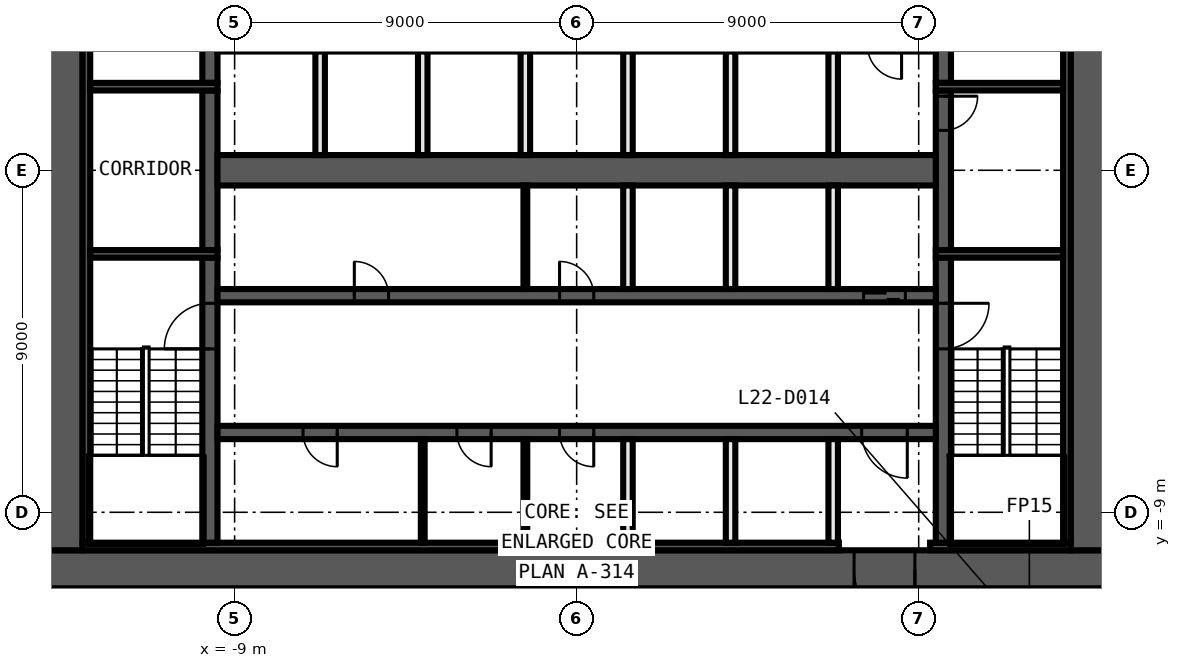
"""IFC4 building model, lengths in metres.
Left out: names, types, materials, properties, quantities, classifications, styles, units other than length and angle.
Written with IfcOpenShell. Run it as: python <this file> out.ifc"""

import sys

from ifc_helpers import new_model, si_unit, direction, frame, frame_2d, origin, place, context, subcontext, project, spatial, rectangle, extrude, element, fill, save


model = new_model("IFC4")
c1 = context("Model", 3, precision=1e-05, world=origin(), true_north=direction((0.0, 1.0)))
c2 = subcontext(c1, "Body", "Model", "MODEL_VIEW")
j1 = project(units=[si_unit("LENGTHUNIT", "METRE"), si_unit("PLANEANGLEUNIT", "RADIAN")], contexts=[c1])
p1 = place(None, origin())
s1 = spatial("IfcSite", under=j1, at=p1, CompositionType="ELEMENT")
p2 = place(p1, origin())
s2 = spatial("IfcBuilding", under=s1, at=p2, CompositionType="ELEMENT")
p3 = place(p2, frame((0.0, 0.0, 106.3)))
s3 = spatial("IfcBuildingStorey", under=s2, at=p3, CompositionType="ELEMENT", Elevation=106.3)
p4 = place(p3, frame((14.0, -10.5, 0.0), z_axis=(0.0, 0.0, 1.0), x_axis=(-1.0, 0.0, 0.0)))
e1 = element("IfcWall", 1, at=p4, inside=s3, PredefinedType="SHEAR", context=c2, shape_type="SweptSolid", body=[
    extrude(rectangle(XDim=28.0, YDim=1.0, at=frame_2d((14.0, 0.0))), origin(), (0.0, 0.0, 1.0), 3.3),
])
p5 = place(p4, frame((5.1, 0.0, 0.0)))
e2 = element("IfcOpeningElement", 2, at=p5, cuts=e1, PredefinedType="OPENING", context=c2, shape_type="SweptSolid", body=[
    extrude(rectangle(XDim=1.6, YDim=2.1, at=frame_2d((0.8, 1.05))), frame((0.0, 0.51, 0.0), z_axis=(0.0, -1.0, 0.0), x_axis=(1.0, 0.0, 0.0)), (0.0, 0.0, 1.0), 1.02),
])
for number, where, z_axis, x_axis in (
    (3, (13.5, 10.0, 0.0), (0.0, 0.0, 1.0), (0.0, -1.0, 0.0)),
    (4, (-13.5, -10.0, 0.0), (0.0, 0.0, 1.0), (0.0, 1.0, 0.0)),
):
    element("IfcWall", number, at=place(p3, frame(where, z_axis=z_axis, x_axis=x_axis)), inside=s3, PredefinedType="SHEAR", context=c2, shape_type="SweptSolid", body=[
        extrude(rectangle(XDim=20.0, YDim=1.0, at=frame_2d((10.0, 0.0))), origin(), (0.0, 0.0, 1.0), 3.3),
    ])
p6 = place(p3, frame((13.0, -9.9, 0.0), z_axis=(0.0, 0.0, 1.0), x_axis=(-1.0, 0.0, 0.0)))
e5 = element("IfcWall", 5, at=p6, inside=s3, PredefinedType="SHEAR", context=c2, shape_type="SweptSolid", body=[
    extrude(rectangle(XDim=3.7, YDim=0.2, at=frame_2d((1.85, 0.0))), origin(), (0.0, 0.0, 1.0), 3.3),
])
p7 = place(p3, frame((6.9, -9.9, 0.0), z_axis=(0.0, 0.0, 1.0), x_axis=(-1.0, 0.0, 0.0)))
e6 = element("IfcWall", 6, at=p7, inside=s3, PredefinedType="SHEAR", context=c2, shape_type="SweptSolid", body=[
    extrude(rectangle(XDim=19.9, YDim=0.2, at=frame_2d((9.95, 0.0))), origin(), (0.0, 0.0, 1.0), 3.3),
])
for number, where, z_axis, x_axis in (
    (7, (12.9, 9.8, 0.0), (0.0, 0.0, 1.0), (0.0, -1.0, 0.0)),
    (8, (-12.9, -9.8, 0.0), (0.0, 0.0, 1.0), (0.0, 1.0, 0.0)),
):
    element("IfcWall", number, at=place(p3, frame(where, z_axis=z_axis, x_axis=x_axis)), inside=s3, PredefinedType="SHEAR", context=c2, shape_type="SweptSolid", body=[
        extrude(rectangle(XDim=19.6, YDim=0.2, at=frame_2d((9.8, 0.0))), origin(), (0.0, 0.0, 1.0), 3.3),
    ])
p8 = place(p3, frame((9.65, -2.3, 0.0), z_axis=(0.0, 0.0, 1.0), x_axis=(0.0, -1.0, 0.0)))
e9 = element("IfcWall", 9, at=p8, inside=s3, PredefinedType="SHEAR", context=c2, shape_type="SweptSolid", body=[
    extrude(rectangle(XDim=7.5, YDim=0.4, at=frame_2d((3.75, 0.0))), origin(), (0.0, 0.0, 1.0), 3.3),
])
p9 = place(p8, frame((1.2, 0.0, 0.0)))
e10 = element("IfcOpeningElement", 10, at=p9, cuts=e9, PredefinedType="OPENING", context=c2, shape_type="SweptSolid", body=[
    extrude(rectangle(XDim=1.2, YDim=2.1, at=frame_2d((0.6, 1.05))), frame((0.0, 0.21, 0.0), z_axis=(0.0, -1.0, 0.0), x_axis=(1.0, 0.0, 0.0)), (0.0, 0.0, 1.0), 0.42),
])
p10 = place(p3, frame((9.65, 2.1, 0.0), z_axis=(0.0, 0.0, 1.0), x_axis=(0.0, -1.0, 0.0)))
e11 = element("IfcWall", 11, at=p10, inside=s3, PredefinedType="SHEAR", context=c2, shape_type="SweptSolid", body=[
    extrude(rectangle(XDim=4.2, YDim=0.4, at=frame_2d((2.1, 0.0))), origin(), (0.0, 0.0, 1.0), 3.3),
])
p11 = place(p10, frame((0.15, 0.0, 0.0)))
e12 = element("IfcOpeningElement", 12, at=p11, cuts=e11, PredefinedType="OPENING", context=c2, shape_type="SweptSolid", body=[
    extrude(rectangle(XDim=0.9, YDim=2.1, at=frame_2d((0.45, 1.05))), frame((0.0, 0.21, 0.0), z_axis=(0.0, -1.0, 0.0), x_axis=(1.0, 0.0, 0.0)), (0.0, 0.0, 1.0), 0.42),
])
p12 = place(p3, frame((9.65, 9.8, 0.0), z_axis=(0.0, 0.0, 1.0), x_axis=(0.0, -1.0, 0.0)))
e13 = element("IfcWall", 13, at=p12, inside=s3, PredefinedType="SHEAR", context=c2, shape_type="SweptSolid", body=[
    extrude(rectangle(XDim=7.5, YDim=0.4, at=frame_2d((3.75, 0.0))), origin(), (0.0, 0.0, 1.0), 3.3),
])
p13 = place(p12, frame((5.1, 0.0, 0.0)))
e14 = element("IfcOpeningElement", 14, at=p13, cuts=e13, PredefinedType="OPENING", context=c2, shape_type="SweptSolid", body=[
    extrude(rectangle(XDim=1.2, YDim=2.1, at=frame_2d((0.6, 1.05))), frame((0.0, 0.21, 0.0), z_axis=(0.0, -1.0, 0.0), x_axis=(1.0, 0.0, 0.0)), (0.0, 0.0, 1.0), 0.42),
])
p14 = place(p3, frame((-9.65, -9.8, 0.0), z_axis=(0.0, 0.0, 1.0), x_axis=(0.0, 1.0, 0.0)))
e15 = element("IfcWall", 15, at=p14, inside=s3, PredefinedType="SHEAR", context=c2, shape_type="SweptSolid", body=[
    extrude(rectangle(XDim=7.5, YDim=0.4, at=frame_2d((3.75, 0.0))), origin(), (0.0, 0.0, 1.0), 3.3),
])
p15 = place(p14, frame((5.1, 0.0, 0.0)))
e16 = element("IfcOpeningElement", 16, at=p15, cuts=e15, PredefinedType="OPENING", context=c2, shape_type="SweptSolid", body=[
    extrude(rectangle(XDim=1.2, YDim=2.1, at=frame_2d((0.6, 1.05))), frame((0.0, 0.21, 0.0), z_axis=(0.0, -1.0, 0.0), x_axis=(1.0, 0.0, 0.0)), (0.0, 0.0, 1.0), 0.42),
])
p16 = place(p3, frame((-9.65, -2.1, 0.0), z_axis=(0.0, 0.0, 1.0), x_axis=(0.0, 1.0, 0.0)))
e17 = element("IfcWall", 17, at=p16, inside=s3, PredefinedType="SHEAR", context=c2, shape_type="SweptSolid", body=[
    extrude(rectangle(XDim=4.2, YDim=0.4, at=frame_2d((2.1, 0.0))), origin(), (0.0, 0.0, 1.0), 3.3),
])
p17 = place(p3, frame((-9.65, 2.3, 0.0), z_axis=(0.0, 0.0, 1.0), x_axis=(0.0, 1.0, 0.0)))
e18 = element("IfcWall", 18, at=p17, inside=s3, PredefinedType="SHEAR", context=c2, shape_type="SweptSolid", body=[
    extrude(rectangle(XDim=7.5, YDim=0.4, at=frame_2d((3.75, 0.0))), origin(), (0.0, 0.0, 1.0), 3.3),
])
p18 = place(p17, frame((1.2, 0.0, 0.0)))
e19 = element("IfcOpeningElement", 19, at=p18, cuts=e18, PredefinedType="OPENING", context=c2, shape_type="SweptSolid", body=[
    extrude(rectangle(XDim=1.2, YDim=2.1, at=frame_2d((0.6, 1.05))), frame((0.0, 0.21, 0.0), z_axis=(0.0, -1.0, 0.0), x_axis=(1.0, 0.0, 0.0)), (0.0, 0.0, 1.0), 0.42),
])
for number, where, z_axis, x_axis in (
    (20, (9.45, 2.2, 0.0), (0.0, 0.0, 1.0), (1.0, 0.0, 0.0)),
    (21, (-9.45, 2.2, 0.0), (0.0, 0.0, 1.0), (-1.0, 0.0, 0.0)),
    (22, (9.45, -2.2, 0.0), (0.0, 0.0, 1.0), (1.0, 0.0, 0.0)),
    (23, (-9.45, -2.2, 0.0), (0.0, 0.0, 1.0), (-1.0, 0.0, 0.0)),
):
    element("IfcWall", number, at=place(p3, frame(where, z_axis=z_axis, x_axis=x_axis)), inside=s3, PredefinedType="SHEAR", context=c2, shape_type="SweptSolid", body=[
        extrude(rectangle(XDim=3.35, YDim=0.2, at=frame_2d((1.675, 0.0))), origin(), (0.0, 0.0, 1.0), 3.3),
    ])
p19 = place(p3, frame((-9.45, -3.3, 0.0), z_axis=(0.0, 0.0, 1.0), x_axis=(1.0, 0.0, 0.0)))
e24 = element("IfcWall", 24, at=p19, inside=s3, PredefinedType="SHEAR", context=c2, shape_type="SweptSolid", body=[
    extrude(rectangle(XDim=18.9, YDim=0.35, at=frame_2d((9.45, 0.0))), origin(), (0.0, 0.0, 1.0), 3.3),
])
p20 = place(p19, frame((17.0, 0.0, 0.0)))
e25 = element("IfcOpeningElement", 25, at=p20, cuts=e24, PredefinedType="OPENING", context=c2, shape_type="SweptSolid", body=[
    extrude(rectangle(XDim=1.1, YDim=2.1, at=frame_2d((0.55, 1.05))), frame((0.0, 0.185, 0.0), z_axis=(0.0, -1.0, 0.0), x_axis=(1.0, 0.0, 0.0)), (0.0, 0.0, 1.0), 0.37),
])
p21 = place(p19, frame((3.6, 0.0, 0.0)))
e26 = element("IfcOpeningElement", 26, at=p21, cuts=e24, PredefinedType="OPENING", context=c2, shape_type="SweptSolid", body=[
    extrude(rectangle(XDim=0.9, YDim=2.1, at=frame_2d((0.45, 1.05))), frame((0.0, 0.185, 0.0), z_axis=(0.0, -1.0, 0.0), x_axis=(1.0, 0.0, 0.0)), (0.0, 0.0, 1.0), 0.37),
])
p22 = place(p19, frame((9.0, 0.0, 0.0)))
e27 = element("IfcOpeningElement", 27, at=p22, cuts=e24, PredefinedType="OPENING", context=c2, shape_type="SweptSolid", body=[
    extrude(rectangle(XDim=0.9, YDim=2.1, at=frame_2d((0.45, 1.05))), frame((0.0, 0.185, 0.0), z_axis=(0.0, -1.0, 0.0), x_axis=(1.0, 0.0, 0.0)), (0.0, 0.0, 1.0), 0.37),
])
p23 = place(p3, frame((9.45, -6.9, 0.0), z_axis=(0.0, 0.0, 1.0), x_axis=(-1.0, 0.0, 0.0)))
e28 = element("IfcWall", 28, at=p23, inside=s3, PredefinedType="SHEAR", context=c2, shape_type="SweptSolid", body=[
    extrude(rectangle(XDim=18.9, YDim=0.35, at=frame_2d((9.45, 0.0))), origin(), (0.0, 0.0, 1.0), 3.3),
])
p24 = place(p23, frame((0.75, 0.0, 0.0)))
e29 = element("IfcOpeningElement", 29, at=p24, cuts=e28, PredefinedType="OPENING", context=c2, shape_type="SweptSolid", body=[
    extrude(rectangle(XDim=1.2, YDim=2.1, at=frame_2d((0.6, 1.05))), frame((0.0, 0.185, 0.0), z_axis=(0.0, -1.0, 0.0), x_axis=(1.0, 0.0, 0.0)), (0.0, 0.0, 1.0), 0.37),
])
p25 = place(p23, frame((15.75, 0.0, 0.0)))
e30 = element("IfcOpeningElement", 30, at=p25, cuts=e28, PredefinedType="OPENING", context=c2, shape_type="SweptSolid", body=[
    extrude(rectangle(XDim=0.9, YDim=2.1, at=frame_2d((0.45, 1.05))), frame((0.0, 0.185, 0.0), z_axis=(0.0, -1.0, 0.0), x_axis=(1.0, 0.0, 0.0)), (0.0, 0.0, 1.0), 0.37),
])
p26 = place(p23, frame((11.7, 0.0, 0.0)))
e31 = element("IfcOpeningElement", 31, at=p26, cuts=e28, PredefinedType="OPENING", context=c2, shape_type="SweptSolid", body=[
    extrude(rectangle(XDim=0.9, YDim=2.1, at=frame_2d((0.45, 1.05))), frame((0.0, 0.185, 0.0), z_axis=(0.0, -1.0, 0.0), x_axis=(1.0, 0.0, 0.0)), (0.0, 0.0, 1.0), 0.37),
])
p27 = place(p23, frame((9.0, 0.0, 0.0)))
e32 = element("IfcOpeningElement", 32, at=p27, cuts=e28, PredefinedType="OPENING", context=c2, shape_type="SweptSolid", body=[
    extrude(rectangle(XDim=0.9, YDim=2.1, at=frame_2d((0.45, 1.05))), frame((0.0, 0.185, 0.0), z_axis=(0.0, -1.0, 0.0), x_axis=(1.0, 0.0, 0.0)), (0.0, 0.0, 1.0), 0.37),
])
p28 = place(p3, frame((-9.45, 0.0, 0.0), z_axis=(0.0, 0.0, 1.0), x_axis=(1.0, 0.0, 0.0)))
e33 = element("IfcWall", 33, at=p28, inside=s3, PredefinedType="SHEAR", context=c2, shape_type="SweptSolid", body=[
    extrude(rectangle(XDim=18.9, YDim=0.8, at=frame_2d((9.45, 0.0))), origin(), (0.0, 0.0, 1.0), 3.3),
])
for number, where, z_axis, x_axis in (
    (34, (6.75, -9.8, 0.0), (0.0, 0.0, 1.0), (0.0, 1.0, 0.0)),
    (35, (6.75, -3.125, 0.0), (0.0, 0.0, 1.0), (0.0, 1.0, 0.0)),
    (36, (6.75, 0.4, 0.0), (0.0, 0.0, 1.0), (0.0, 1.0, 0.0)),
    (37, (4.05, -9.8, 0.0), (0.0, 0.0, 1.0), (0.0, 1.0, 0.0)),
    (38, (4.05, -3.125, 0.0), (0.0, 0.0, 1.0), (0.0, 1.0, 0.0)),
    (39, (4.05, 0.4, 0.0), (0.0, 0.0, 1.0), (0.0, 1.0, 0.0)),
    (40, (1.35, -9.8, 0.0), (0.0, 0.0, 1.0), (0.0, 1.0, 0.0)),
    (41, (1.35, -3.125, 0.0), (0.0, 0.0, 1.0), (0.0, 1.0, 0.0)),
    (42, (1.35, 0.4, 0.0), (0.0, 0.0, 1.0), (0.0, 1.0, 0.0)),
):
    element("IfcWall", number, at=place(p3, frame(where, z_axis=z_axis, x_axis=x_axis)), inside=s3, PredefinedType="SOLIDWALL", context=c2, shape_type="SweptSolid", body=[
        extrude(rectangle(XDim=2.725, YDim=0.25, at=frame_2d((1.363, 0.0))), origin(), (0.0, 0.0, 1.0), 3.3),
    ])
for number, where, z_axis, x_axis in (
    (43, (-1.35, -9.8, 0.0), (0.0, 0.0, 1.0), (0.0, 1.0, 0.0)),
    (44, (-1.35, -3.125, 0.0), (0.0, 0.0, 1.0), (0.0, 1.0, 0.0)),
):
    element("IfcWall", number, at=place(p3, frame(where, z_axis=z_axis, x_axis=x_axis)), inside=s3, PredefinedType="PARTITIONING", context=c2, shape_type="SweptSolid", body=[
        extrude(rectangle(XDim=2.725, YDim=0.1, at=frame_2d((1.363, 0.0))), origin(), (0.0, 0.0, 1.0), 3.3),
    ])
p29 = place(p3, frame((-1.35, 0.4, 0.0), z_axis=(0.0, 0.0, 1.0), x_axis=(0.0, 1.0, 0.0)))
e45 = element("IfcWall", 45, at=p29, inside=s3, PredefinedType="SOLIDWALL", context=c2, shape_type="SweptSolid", body=[
    extrude(rectangle(XDim=2.725, YDim=0.25, at=frame_2d((1.363, 0.0))), origin(), (0.0, 0.0, 1.0), 3.3),
])
p30 = place(p3, frame((-4.05, -9.8, 0.0), z_axis=(0.0, 0.0, 1.0), x_axis=(0.0, 1.0, 0.0)))
e46 = element("IfcWall", 46, at=p30, inside=s3, PredefinedType="PARTITIONING", context=c2, shape_type="SweptSolid", body=[
    extrude(rectangle(XDim=2.725, YDim=0.1, at=frame_2d((1.363, 0.0))), origin(), (0.0, 0.0, 1.0), 3.3),
])
for number, where, z_axis, x_axis in (
    (47, (-4.05, 0.4, 0.0), (0.0, 0.0, 1.0), (0.0, 1.0, 0.0)),
    (48, (-6.75, 0.4, 0.0), (0.0, 0.0, 1.0), (0.0, 1.0, 0.0)),
):
    element("IfcWall", number, at=place(p3, frame(where, z_axis=z_axis, x_axis=x_axis)), inside=s3, PredefinedType="SOLIDWALL", context=c2, shape_type="SweptSolid", body=[
        extrude(rectangle(XDim=2.725, YDim=0.25, at=frame_2d((1.363, 0.0))), origin(), (0.0, 0.0, 1.0), 3.3),
    ])
p31 = place(p11, origin())
e49 = element("IfcDoor", 49, at=p31, inside=s3, OperationType="SINGLE_SWING_RIGHT", PredefinedType="DOOR", context=c2, shape_type="SweptSolid", body=[
    extrude(rectangle(XDim=0.9, YDim=2.1, at=frame_2d((0.45, 1.05))), frame((0.0, 0.025, 0.0), z_axis=(0.0, -1.0, 0.0), x_axis=(1.0, 0.0, 0.0)), (0.0, 0.0, 1.0), 0.05),
])
fill(e12, e49)
p32 = place(p20, origin())
e50 = element("IfcDoor", 50, at=p32, inside=s3, OperationType="DOUBLE_DOOR_SLIDING", PredefinedType="DOOR", context=c2, shape_type="SweptSolid", body=[
    extrude(rectangle(XDim=1.1, YDim=2.1, at=frame_2d((0.55, 1.05))), frame((0.0, 0.025, 0.0), z_axis=(0.0, -1.0, 0.0), x_axis=(1.0, 0.0, 0.0)), (0.0, 0.0, 1.0), 0.05),
])
fill(e25, e50)
p33 = place(p5, origin())
e51 = element("IfcDoor", 51, at=p33, inside=s3, OperationType="DOUBLE_DOOR_SINGLE_SWING", PredefinedType="DOOR", context=c2, shape_type="SweptSolid", body=[
    extrude(rectangle(XDim=1.6, YDim=2.1, at=frame_2d((0.8, 1.05))), frame((0.0, 0.025, 0.0), z_axis=(0.0, -1.0, 0.0), x_axis=(1.0, 0.0, 0.0)), (0.0, 0.0, 1.0), 0.05),
])
fill(e2, e51)
p34 = place(p24, origin())
e52 = element("IfcDoor", 52, at=p34, inside=s3, OperationType="SINGLE_SWING_LEFT", PredefinedType="DOOR", context=c2, shape_type="SweptSolid", body=[
    extrude(rectangle(XDim=1.2, YDim=2.1, at=frame_2d((0.6, 1.05))), frame((0.0, 0.025, 0.0), z_axis=(0.0, -1.0, 0.0), x_axis=(1.0, 0.0, 0.0)), (0.0, 0.0, 1.0), 0.05),
])
fill(e29, e52)
p35 = place(p21, origin())
e53 = element("IfcDoor", 53, at=p35, inside=s3, OperationType="SINGLE_SWING_RIGHT", PredefinedType="DOOR", context=c2, shape_type="SweptSolid", body=[
    extrude(rectangle(XDim=0.9, YDim=2.1, at=frame_2d((0.45, 1.05))), frame((0.0, 0.025, 0.0), z_axis=(0.0, -1.0, 0.0), x_axis=(1.0, 0.0, 0.0)), (0.0, 0.0, 1.0), 0.05),
])
fill(e26, e53)
p36 = place(p22, origin())
e54 = element("IfcDoor", 54, at=p36, inside=s3, OperationType="SINGLE_SWING_LEFT", PredefinedType="DOOR", context=c2, shape_type="SweptSolid", body=[
    extrude(rectangle(XDim=0.9, YDim=2.1, at=frame_2d((0.45, 1.05))), frame((0.0, 0.025, 0.0), z_axis=(0.0, -1.0, 0.0), x_axis=(1.0, 0.0, 0.0)), (0.0, 0.0, 1.0), 0.05),
])
fill(e27, e54)
p37 = place(p25, origin())
e55 = element("IfcDoor", 55, at=p37, inside=s3, OperationType="SINGLE_SWING_RIGHT", PredefinedType="DOOR", context=c2, shape_type="SweptSolid", body=[
    extrude(rectangle(XDim=0.9, YDim=2.1, at=frame_2d((0.45, 1.05))), frame((0.0, 0.025, 0.0), z_axis=(0.0, -1.0, 0.0), x_axis=(1.0, 0.0, 0.0)), (0.0, 0.0, 1.0), 0.05),
])
fill(e30, e55)
p38 = place(p26, origin())
e56 = element("IfcDoor", 56, at=p38, inside=s3, OperationType="SINGLE_SWING_LEFT", PredefinedType="DOOR", context=c2, shape_type="SweptSolid", body=[
    extrude(rectangle(XDim=0.9, YDim=2.1, at=frame_2d((0.45, 1.05))), frame((0.0, 0.025, 0.0), z_axis=(0.0, -1.0, 0.0), x_axis=(1.0, 0.0, 0.0)), (0.0, 0.0, 1.0), 0.05),
])
fill(e31, e56)
p39 = place(p27, origin())
e57 = element("IfcDoor", 57, at=p39, inside=s3, OperationType="SINGLE_SWING_RIGHT", PredefinedType="DOOR", context=c2, shape_type="SweptSolid", body=[
    extrude(rectangle(XDim=0.9, YDim=2.1, at=frame_2d((0.45, 1.05))), frame((0.0, 0.025, 0.0), z_axis=(0.0, -1.0, 0.0), x_axis=(1.0, 0.0, 0.0)), (0.0, 0.0, 1.0), 0.05),
])
fill(e32, e57)
p40 = place(p9, origin())
e58 = element("IfcDoor", 58, at=p40, inside=s3, OperationType="SINGLE_SWING_RIGHT", PredefinedType="DOOR", context=c2, shape_type="SweptSolid", body=[
    extrude(rectangle(XDim=1.2, YDim=2.1, at=frame_2d((0.6, 1.05))), frame((0.0, 0.025, 0.0), z_axis=(0.0, -1.0, 0.0), x_axis=(1.0, 0.0, 0.0)), (0.0, 0.0, 1.0), 0.05),
])
fill(e10, e58)
p41 = place(p15, origin())
e59 = element("IfcDoor", 59, at=p41, inside=s3, OperationType="SINGLE_SWING_LEFT", PredefinedType="DOOR", context=c2, shape_type="SweptSolid", body=[
    extrude(rectangle(XDim=1.2, YDim=2.1, at=frame_2d((0.6, 1.05))), frame((0.0, 0.025, 0.0), z_axis=(0.0, -1.0, 0.0), x_axis=(1.0, 0.0, 0.0)), (0.0, 0.0, 1.0), 0.05),
])
fill(e16, e59)
save(model, sys.argv[1])
